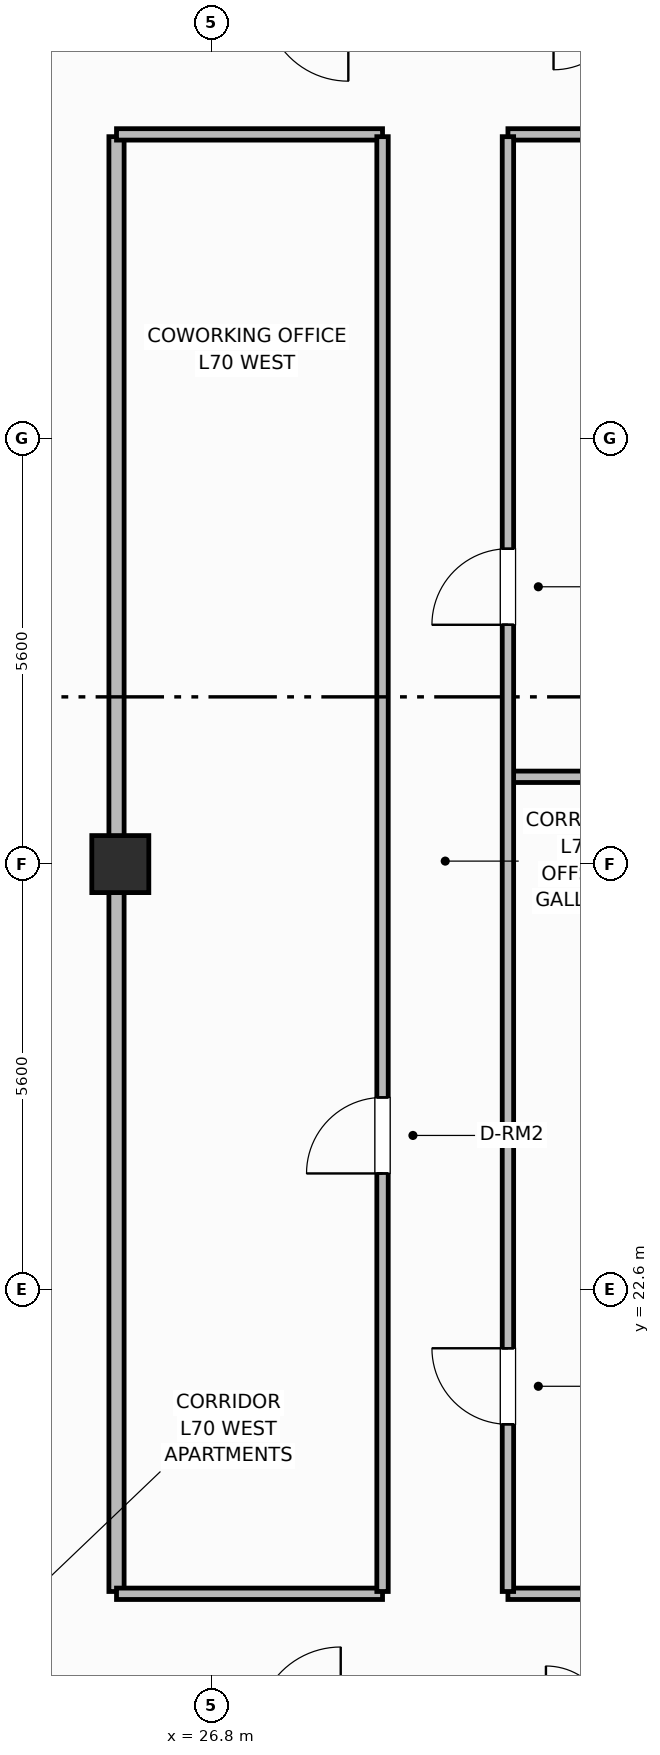
"""IFC4 building model, lengths in metres.
Left out: names, types, materials, properties, quantities, classifications, styles, units other than length and angle.
Written with IfcOpenShell. Run it as: python <this file> out.ifc"""

import sys

from ifc_helpers import new_model, si_unit, direction, frame, frame_2d, origin, origin_2d, place, context, subcontext, project, spatial, rectangle, extrude, element, fill, save


model = new_model("IFC4")
c1 = context("Model", 3, precision=1e-05, world=origin(), true_north=direction((0.0, 1.0)))
c2 = subcontext(c1, "Body", "Model", "MODEL_VIEW")
j1 = project(units=[si_unit("LENGTHUNIT", "METRE"), si_unit("PLANEANGLEUNIT", "RADIAN")], contexts=[c1])
p1 = place(None, origin())
s1 = spatial("IfcSite", under=j1, at=p1, CompositionType="ELEMENT")
p2 = place(p1, origin())
s2 = spatial("IfcBuilding", under=s1, at=p2, CompositionType="ELEMENT")
p3 = place(p2, frame((0.0, 0.0, 278.7)))
s3 = spatial("IfcBuildingStorey", under=s2, at=p3, CompositionType="ELEMENT", Elevation=278.7)
p4 = place(p3, frame((25.6, 28.2, 0.0), z_axis=(0.0, 0.0, 1.0), x_axis=(1.0, 0.0, 0.0)))
e1 = element("IfcColumn", 1, at=p4, inside=s3, PredefinedType="COLUMN", context=c2, shape_type="SweptSolid", body=[
    extrude(rectangle(XDim=0.75, YDim=0.75, at=origin_2d()), origin(), (0.0, 0.0, 1.0), 3.7),
])
p5 = place(p3, frame((25.55, 18.63, 0.0), z_axis=(0.0, 0.0, 1.0), x_axis=(0.0, 1.0, 0.0)))
e2 = element("IfcWall", 2, at=p5, inside=s3, PredefinedType="PARTITIONING", context=c2, shape_type="SweptSolid", body=[
    extrude(rectangle(XDim=19.14, YDim=0.2, at=frame_2d((9.57, 0.0))), origin(), (0.0, 0.0, 1.0), 2.56),
])
p6 = place(p3, frame((25.55, 18.6, 0.0), z_axis=(0.0, 0.0, 1.0), x_axis=(1.0, 0.0, 0.0)))
e3 = element("IfcWall", 3, at=p6, inside=s3, PredefinedType="PARTITIONING", context=c2, shape_type="SweptSolid", body=[
    extrude(rectangle(XDim=3.5, YDim=0.15, at=frame_2d((1.75, 0.0))), origin(), (0.0, 0.0, 1.0), 2.56),
])
p7 = place(p3, frame((30.7, 18.6, 0.0), z_axis=(0.0, 0.0, 1.0), x_axis=(1.0, 0.0, 0.0)))
e4 = element("IfcWall", 4, at=p7, inside=s3, PredefinedType="PARTITIONING", context=c2, shape_type="SweptSolid", body=[
    extrude(rectangle(XDim=22.15, YDim=0.15, at=frame_2d((11.075, 0.0))), origin(), (0.0, 0.0, 1.0), 2.56),
])
p8 = place(p3, frame((25.55, 37.8, 0.0), z_axis=(0.0, 0.0, 1.0), x_axis=(1.0, 0.0, 0.0)))
e5 = element("IfcWall", 5, at=p8, inside=s3, PredefinedType="PARTITIONING", context=c2, shape_type="SweptSolid", body=[
    extrude(rectangle(XDim=3.5, YDim=0.15, at=frame_2d((1.75, 0.0))), origin(), (0.0, 0.0, 1.0), 2.56),
])
p9 = place(p3, frame((30.7, 37.8, 0.0), z_axis=(0.0, 0.0, 1.0), x_axis=(1.0, 0.0, 0.0)))
e6 = element("IfcWall", 6, at=p9, inside=s3, PredefinedType="PARTITIONING", context=c2, shape_type="SweptSolid", body=[
    extrude(rectangle(XDim=22.15, YDim=0.15, at=frame_2d((11.075, 0.0))), origin(), (0.0, 0.0, 1.0), 2.56),
])
p10 = place(p3, frame((30.73, 29.348, 0.0), z_axis=(0.0, 0.0, 1.0), x_axis=(1.0, 0.0, 0.0)))
e7 = element("IfcWall", 7, at=p10, inside=s3, PredefinedType="PARTITIONING", context=c2, shape_type="SweptSolid", body=[
    extrude(rectangle(XDim=22.07, YDim=0.15, at=frame_2d((11.035, 0.0))), origin(), (0.0, 0.0, 1.0), 2.56),
])
p11 = place(p3, frame((29.05, 18.63, 0.0), z_axis=(0.0, 0.0, 1.0), x_axis=(0.0, 1.0, 0.0)))
e8 = element("IfcWall", 8, at=p11, inside=s3, PredefinedType="PARTITIONING", context=c2, shape_type="SweptSolid", body=[
    extrude(rectangle(XDim=19.14, YDim=0.15, at=frame_2d((9.57, 0.0))), origin(), (0.0, 0.0, 1.0), 2.56),
])
p12 = place(p11, frame((5.5, 0.0, 0.0)))
e9 = element("IfcOpeningElement", 9, at=p12, cuts=e8, PredefinedType="OPENING", context=c2, shape_type="SweptSolid", body=[
    extrude(rectangle(XDim=1.0, YDim=2.15, at=frame_2d((0.5, 1.075))), frame((0.0, 0.085, 0.0), z_axis=(0.0, -1.0, 0.0), x_axis=(1.0, 0.0, 0.0)), (0.0, 0.0, 1.0), 0.17),
])
p13 = place(p3, frame((30.7, 18.63, 0.0), z_axis=(0.0, 0.0, 1.0), x_axis=(0.0, 1.0, 0.0)))
e10 = element("IfcWall", 10, at=p13, inside=s3, PredefinedType="PARTITIONING", context=c2, shape_type="SweptSolid", body=[
    extrude(rectangle(XDim=19.14, YDim=0.15, at=frame_2d((9.57, 0.0))), origin(), (0.0, 0.0, 1.0), 2.56),
])
p14 = place(p13, frame((2.2, 0.0, 0.0)))
e11 = element("IfcOpeningElement", 11, at=p14, cuts=e10, PredefinedType="OPENING", context=c2, shape_type="SweptSolid", body=[
    extrude(rectangle(XDim=1.0, YDim=2.15, at=frame_2d((0.5, 1.075))), frame((0.0, 0.085, 0.0), z_axis=(0.0, -1.0, 0.0), x_axis=(1.0, 0.0, 0.0)), (0.0, 0.0, 1.0), 0.17),
])
p15 = place(p13, frame((12.719, 0.0, 0.0)))
e12 = element("IfcOpeningElement", 12, at=p15, cuts=e10, PredefinedType="OPENING", context=c2, shape_type="SweptSolid", body=[
    extrude(rectangle(XDim=1.0, YDim=2.15, at=frame_2d((0.5, 1.075))), frame((0.0, 0.085, 0.0), z_axis=(0.0, -1.0, 0.0), x_axis=(1.0, 0.0, 0.0)), (0.0, 0.0, 1.0), 0.17),
])
p16 = place(p12, origin())
e13 = element("IfcDoor", 13, at=p16, inside=s3, OperationType="SINGLE_SWING_LEFT", PredefinedType="DOOR", context=c2, shape_type="SweptSolid", body=[
    extrude(rectangle(XDim=1.0, YDim=2.15, at=frame_2d((0.5, 1.075))), frame((0.0, 0.025, 0.0), z_axis=(0.0, -1.0, 0.0), x_axis=(1.0, 0.0, 0.0)), (0.0, 0.0, 1.0), 0.05),
])
fill(e9, e13)
p17 = place(p14, origin())
e14 = element("IfcDoor", 14, at=p17, inside=s3, OperationType="SINGLE_SWING_RIGHT", PredefinedType="DOOR", context=c2, shape_type="SweptSolid", body=[
    extrude(rectangle(XDim=1.0, YDim=2.15, at=frame_2d((0.5, 1.075))), frame((0.0, 0.025, 0.0), z_axis=(0.0, -1.0, 0.0), x_axis=(1.0, 0.0, 0.0)), (0.0, 0.0, 1.0), 0.05),
])
fill(e11, e14)
p18 = place(p15, origin())
e15 = element("IfcDoor", 15, at=p18, inside=s3, OperationType="SINGLE_SWING_LEFT", PredefinedType="DOOR", context=c2, shape_type="SweptSolid", body=[
    extrude(rectangle(XDim=1.0, YDim=2.15, at=frame_2d((0.5, 1.075))), frame((0.0, 0.025, 0.0), z_axis=(0.0, -1.0, 0.0), x_axis=(1.0, 0.0, 0.0)), (0.0, 0.0, 1.0), 0.05),
])
fill(e12, e15)
save(model, sys.argv[1])
